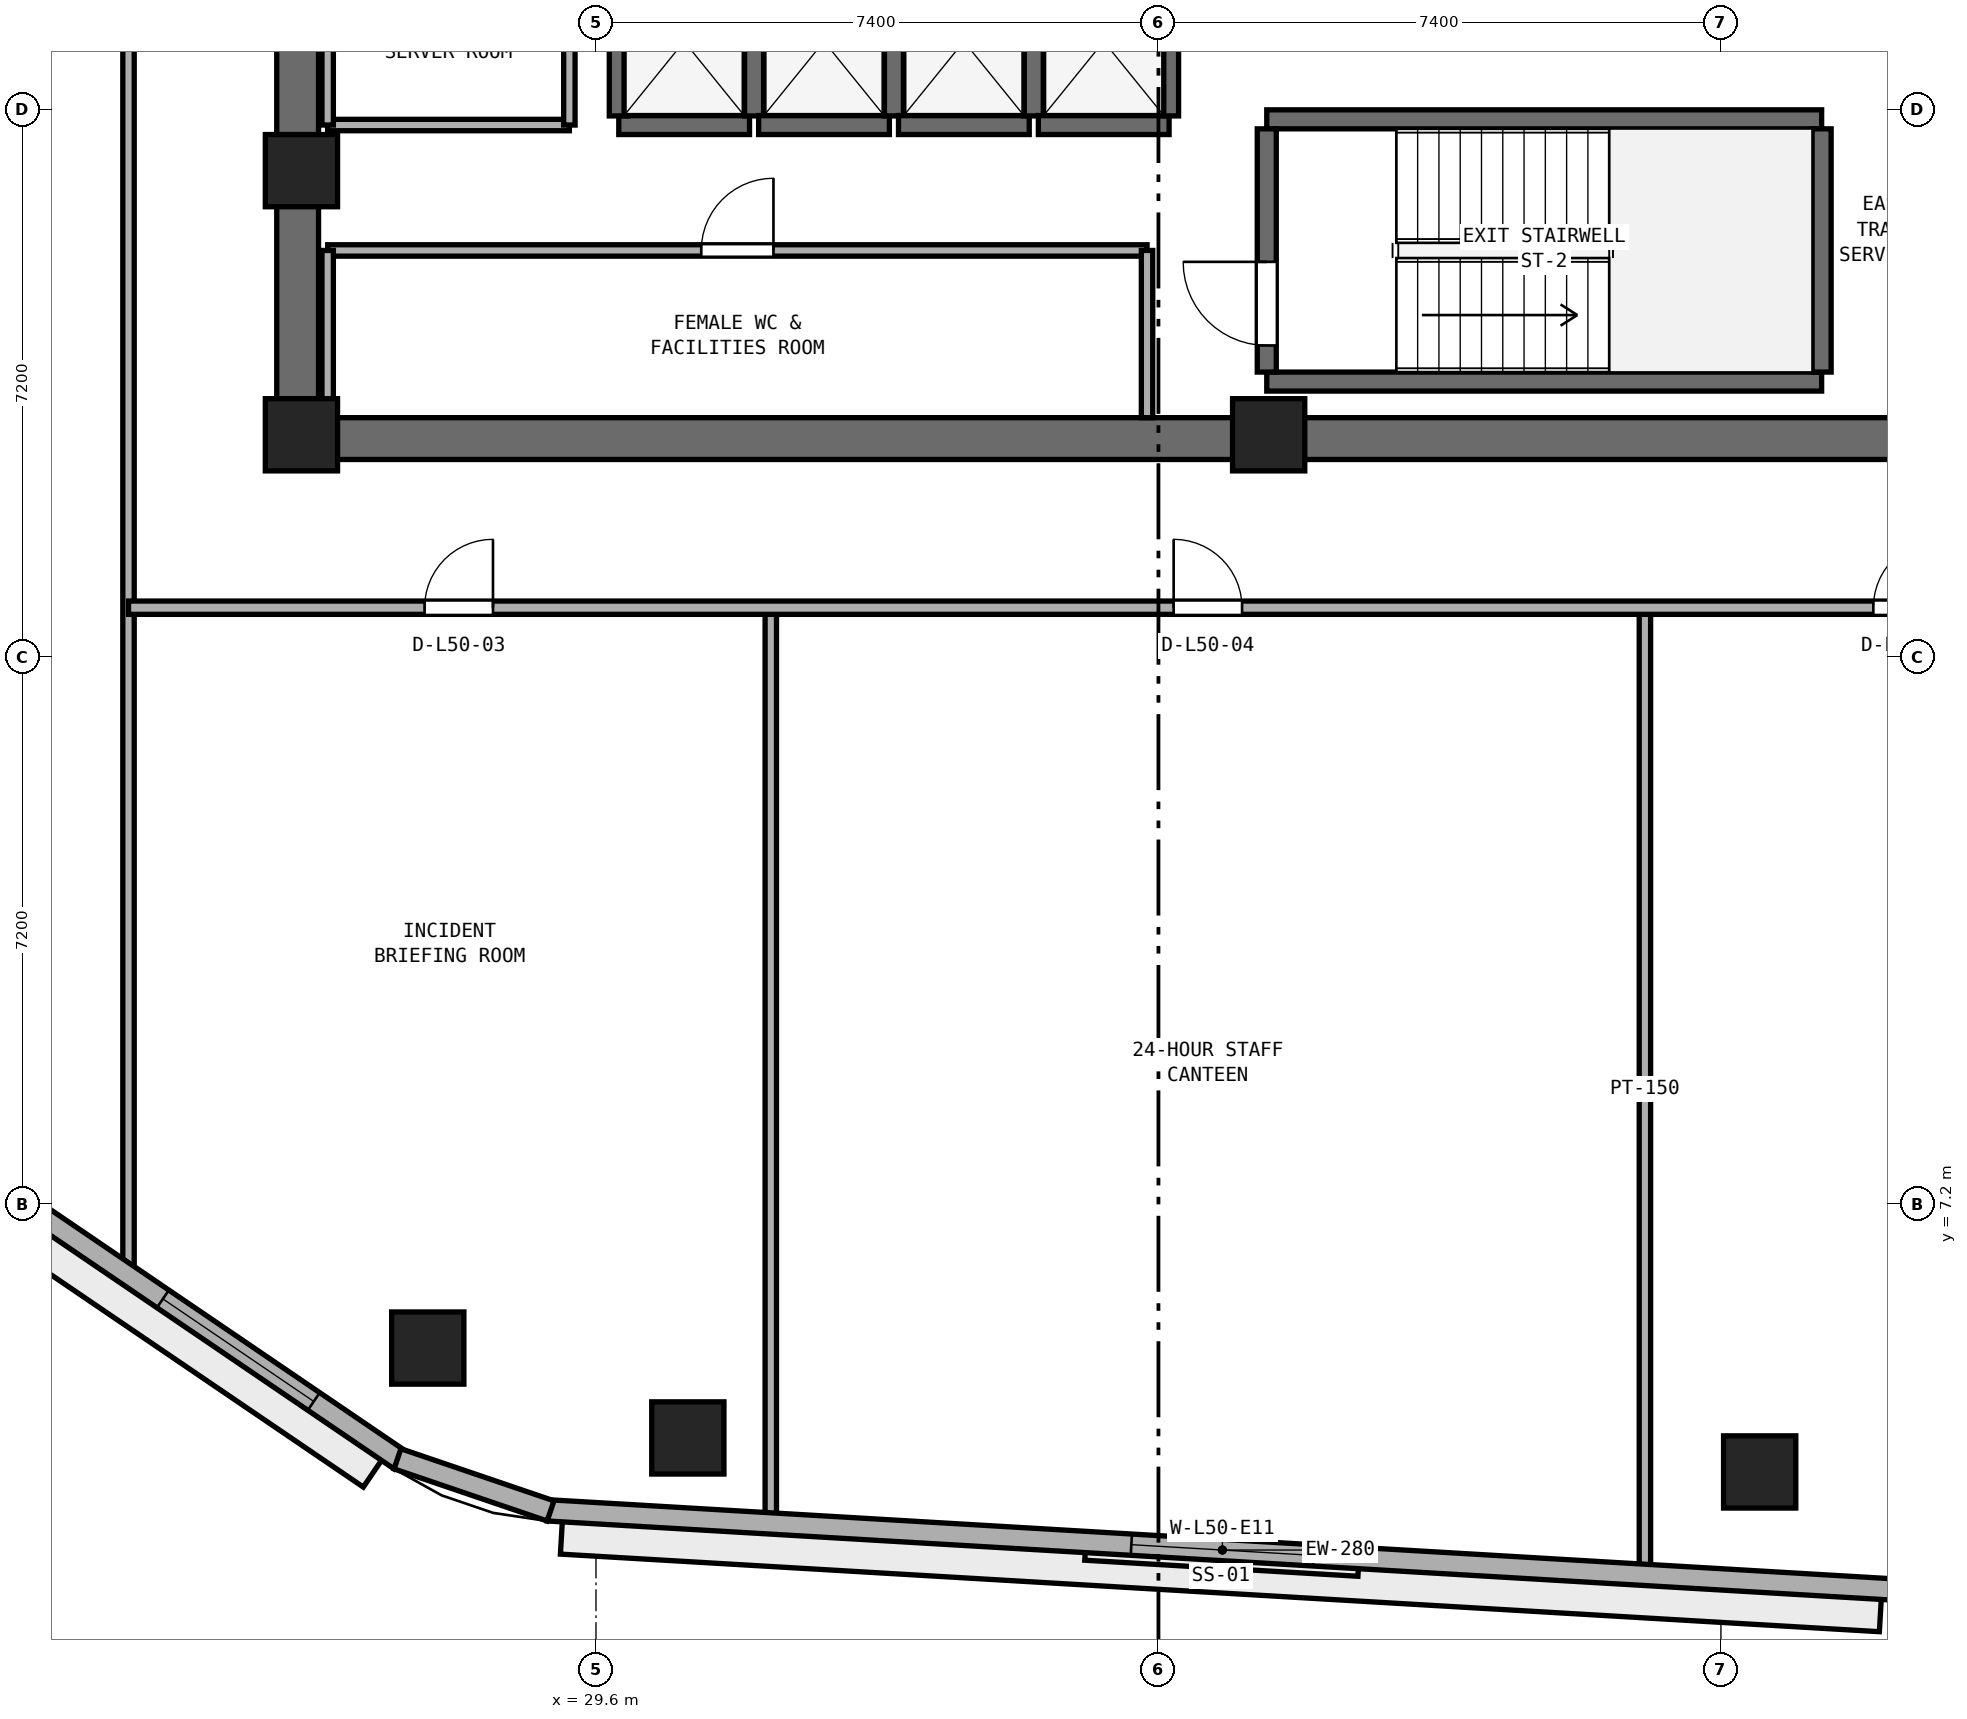
"""IFC4 building model, lengths in metres.
Left out: names, types, materials, properties, quantities, classifications, styles, units other than length and angle.
Written with IfcOpenShell. Run it as: python <this file> out.ifc"""

import sys

from ifc_helpers import new_model, si_unit, direction, frame, frame_2d, origin, origin_2d, place, context, subcontext, project, spatial, rectangle, extrude, element, fill, save


model = new_model("IFC4")
c1 = context("Model", 3, precision=1e-05, world=origin(), true_north=direction((0.0, 1.0)))
c2 = subcontext(c1, "Body", "Model", "MODEL_VIEW")
j1 = project(units=[si_unit("LENGTHUNIT", "METRE"), si_unit("PLANEANGLEUNIT", "RADIAN")], contexts=[c1])
p1 = place(None, origin())
s1 = spatial("IfcSite", under=j1, at=p1, CompositionType="ELEMENT")
p2 = place(p1, origin())
s2 = spatial("IfcBuilding", under=s1, at=p2, CompositionType="ELEMENT")
p3 = place(p2, frame((0.0, 0.0, 197.2)))
s3 = spatial("IfcBuildingStorey", under=s2, at=p3, CompositionType="ELEMENT", Elevation=197.2)
p4 = place(p3, frame((25.4, 17.275, 0.0), z_axis=(0.0, 0.0, 1.0), x_axis=(1.0, 0.0, 0.0)))
e1 = element("IfcWall", 1, at=p4, inside=s3, PredefinedType="SHEAR", context=c2, shape_type="SweptSolid", body=[
    extrude(rectangle(XDim=23.2, YDim=0.55, at=frame_2d((11.6, 0.0))), origin(), (0.0, 0.0, 1.0), 3.54),
])
p5 = place(p3, frame((25.675, 17.55, 0.0), z_axis=(0.0, 0.0, 1.0), x_axis=(0.0, 1.0, 0.0)))
e2 = element("IfcWall", 2, at=p5, inside=s3, PredefinedType="SHEAR", context=c2, shape_type="SweptSolid", body=[
    extrude(rectangle(XDim=15.3, YDim=0.55, at=frame_2d((7.65, 0.0))), origin(), (0.0, 0.0, 1.0), 3.54),
])
p6 = place(p5, frame((6.9, 0.0, 0.0)))
e3 = element("IfcOpeningElement", 3, at=p6, cuts=e2, PredefinedType="OPENING", context=c2, shape_type="SweptSolid", body=[
    extrude(rectangle(XDim=1.5, YDim=2.15, at=frame_2d((0.75, 1.075))), frame((0.0, 0.285, 0.0), z_axis=(0.0, -1.0, 0.0), x_axis=(1.0, 0.0, 0.0)), (0.0, 0.0, 1.0), 0.57),
])
for number, where, z_axis, x_axis in (
    (4, (25.725, 17.325, 0.0), (0.0, 0.0, 1.0), (1.0, 0.0, 0.0)),
    (5, (38.45, 17.325, 0.0), (0.0, 0.0, 1.0), (1.0, 0.0, 0.0)),
    (6, (25.725, 20.8, 0.0), (0.0, 0.0, 1.0), (1.0, 0.0, 0.0)),
):
    element("IfcColumn", number, at=place(p3, frame(where, z_axis=z_axis, x_axis=x_axis)), inside=s3, PredefinedType="PILASTER", context=c2, shape_type="SweptSolid", body=[
        extrude(rectangle(XDim=0.95, YDim=0.95, at=origin_2d()), origin(), (0.0, 0.0, 1.0), 3.8),
    ])
for number, where, z_axis, x_axis in (
    (7, (30.809, 4.127, 0.0), (0.0, 0.0, 1.0), (1.0, 0.0, 0.0)),
    (8, (44.91, 3.68, 0.0), (0.0, 0.0, 1.0), (1.0, 0.0, 0.0)),
    (9, (27.387, 5.31, 0.0), (0.0, 0.0, 1.0), (1.0, 0.0, 0.0)),
):
    element("IfcColumn", number, at=place(p3, frame(where, z_axis=z_axis, x_axis=x_axis)), inside=s3, PredefinedType="COLUMN", context=c2, shape_type="SweptSolid", body=[
        extrude(rectangle(XDim=0.95, YDim=0.95, at=origin_2d()), origin(), (0.0, 0.0, 1.0), 3.8),
    ])
for number, where, z_axis, x_axis in (
    (10, (38.425, 18.025, 0.0), (0.0, 0.0, 1.0), (1.0, 0.0, 0.0)),
    (11, (38.425, 21.475, 0.0), (0.0, 0.0, 1.0), (1.0, 0.0, 0.0)),
):
    element("IfcWall", number, at=place(p3, frame(where, z_axis=z_axis, x_axis=x_axis)), inside=s3, PredefinedType="SHEAR", context=c2, shape_type="SweptSolid", body=[
        extrude(rectangle(XDim=7.3, YDim=0.25, at=frame_2d((3.65, 0.0))), origin(), (0.0, 0.0, 1.0), 3.54),
    ])
p7 = place(p3, frame((38.425, 18.15, 0.0), z_axis=(0.0, 0.0, 1.0), x_axis=(0.0, 1.0, 0.0)))
e12 = element("IfcWall", 12, at=p7, inside=s3, PredefinedType="SHEAR", context=c2, shape_type="SweptSolid", body=[
    extrude(rectangle(XDim=3.2, YDim=0.25, at=frame_2d((1.6, 0.0))), origin(), (0.0, 0.0, 1.0), 3.54),
])
p8 = place(p7, frame((0.35, 0.0, 0.0)))
e13 = element("IfcOpeningElement", 13, at=p8, cuts=e12, PredefinedType="OPENING", context=c2, shape_type="SweptSolid", body=[
    extrude(rectangle(XDim=1.1, YDim=2.15, at=frame_2d((0.55, 1.075))), frame((0.0, 0.135, 0.0), z_axis=(0.0, -1.0, 0.0), x_axis=(1.0, 0.0, 0.0)), (0.0, 0.0, 1.0), 0.27),
])
p9 = place(p3, frame((45.725, 18.15, 0.0), z_axis=(0.0, 0.0, 1.0), x_axis=(0.0, 1.0, 0.0)))
e14 = element("IfcWall", 14, at=p9, inside=s3, PredefinedType="SHEAR", context=c2, shape_type="SweptSolid", body=[
    extrude(rectangle(XDim=3.2, YDim=0.25, at=frame_2d((1.6, 0.0))), origin(), (0.0, 0.0, 1.0), 3.54),
])
p10 = place(p3, frame((29.9, 21.4, 0.0), z_axis=(0.0, 0.0, 1.0), x_axis=(1.0, 0.0, 0.0)))
e15 = element("IfcWall", 15, at=p10, inside=s3, PredefinedType="SHEAR", context=c2, shape_type="SweptSolid", body=[
    extrude(rectangle(XDim=1.72, YDim=0.25, at=frame_2d((0.86, 0.0))), origin(), (0.0, 0.0, 1.0), 3.54),
])
for number, where, z_axis, x_axis in (
    (16, (29.9, 21.52, 0.0), (0.0, 0.0, 1.0), (0.0, 1.0, 0.0)),
    (17, (31.68, 21.52, 0.0), (0.0, 0.0, 1.0), (0.0, 1.0, 0.0)),
):
    element("IfcWall", number, at=place(p3, frame(where, z_axis=z_axis, x_axis=x_axis)), inside=s3, PredefinedType="SHEAR", context=c2, shape_type="SweptSolid", body=[
        extrude(rectangle(XDim=1.96, YDim=0.25, at=frame_2d((0.98, 0.0))), origin(), (0.0, 0.0, 1.0), 3.54),
    ])
p11 = place(p3, frame((31.74, 21.4, 0.0), z_axis=(0.0, 0.0, 1.0), x_axis=(1.0, 0.0, 0.0)))
e18 = element("IfcWall", 18, at=p11, inside=s3, PredefinedType="SHEAR", context=c2, shape_type="SweptSolid", body=[
    extrude(rectangle(XDim=1.72, YDim=0.25, at=frame_2d((0.86, 0.0))), origin(), (0.0, 0.0, 1.0), 3.54),
])
p12 = place(p3, frame((33.52, 21.52, 0.0), z_axis=(0.0, 0.0, 1.0), x_axis=(0.0, 1.0, 0.0)))
e19 = element("IfcWall", 19, at=p12, inside=s3, PredefinedType="SHEAR", context=c2, shape_type="SweptSolid", body=[
    extrude(rectangle(XDim=1.96, YDim=0.25, at=frame_2d((0.98, 0.0))), origin(), (0.0, 0.0, 1.0), 3.54),
])
p13 = place(p3, frame((33.58, 21.4, 0.0), z_axis=(0.0, 0.0, 1.0), x_axis=(1.0, 0.0, 0.0)))
e20 = element("IfcWall", 20, at=p13, inside=s3, PredefinedType="SHEAR", context=c2, shape_type="SweptSolid", body=[
    extrude(rectangle(XDim=1.72, YDim=0.25, at=frame_2d((0.86, 0.0))), origin(), (0.0, 0.0, 1.0), 3.54),
])
p14 = place(p3, frame((35.36, 21.52, 0.0), z_axis=(0.0, 0.0, 1.0), x_axis=(0.0, 1.0, 0.0)))
e21 = element("IfcWall", 21, at=p14, inside=s3, PredefinedType="SHEAR", context=c2, shape_type="SweptSolid", body=[
    extrude(rectangle(XDim=1.96, YDim=0.25, at=frame_2d((0.98, 0.0))), origin(), (0.0, 0.0, 1.0), 3.54),
])
p15 = place(p3, frame((35.42, 21.4, 0.0), z_axis=(0.0, 0.0, 1.0), x_axis=(1.0, 0.0, 0.0)))
e22 = element("IfcWall", 22, at=p15, inside=s3, PredefinedType="SHEAR", context=c2, shape_type="SweptSolid", body=[
    extrude(rectangle(XDim=1.72, YDim=0.25, at=frame_2d((0.86, 0.0))), origin(), (0.0, 0.0, 1.0), 3.54),
])
p16 = place(p3, frame((37.14, 21.52, 0.0), z_axis=(0.0, 0.0, 1.0), x_axis=(0.0, 1.0, 0.0)))
e23 = element("IfcWall", 23, at=p16, inside=s3, PredefinedType="SHEAR", context=c2, shape_type="SweptSolid", body=[
    extrude(rectangle(XDim=1.96, YDim=0.25, at=frame_2d((0.98, 0.0))), origin(), (0.0, 0.0, 1.0), 3.54),
])
p17 = place(p3, frame((26.07, 19.75, 0.0), z_axis=(0.0, 0.0, 1.0), x_axis=(1.0, 0.0, 0.0)))
e24 = element("IfcWall", 24, at=p17, inside=s3, PredefinedType="PARTITIONING", context=c2, shape_type="SweptSolid", body=[
    extrude(rectangle(XDim=10.78, YDim=0.15, at=frame_2d((5.39, 0.0))), origin(), (0.0, 0.0, 1.0), 3.54),
])
p18 = place(p17, frame((4.915, 0.0, 0.0)))
e25 = element("IfcOpeningElement", 25, at=p18, cuts=e24, PredefinedType="OPENING", context=c2, shape_type="SweptSolid", body=[
    extrude(rectangle(XDim=0.95, YDim=2.1, at=frame_2d((0.475, 1.05))), frame((0.0, 0.085, 0.0), z_axis=(0.0, -1.0, 0.0), x_axis=(1.0, 0.0, 0.0)), (0.0, 0.0, 1.0), 0.17),
])
p19 = place(p3, frame((26.07, 17.55, 0.0), z_axis=(0.0, 0.0, 1.0), x_axis=(0.0, 1.0, 0.0)))
e26 = element("IfcWall", 26, at=p19, inside=s3, PredefinedType="PARTITIONING", context=c2, shape_type="SweptSolid", body=[
    extrude(rectangle(XDim=2.2, YDim=0.15, at=frame_2d((1.1, 0.0))), origin(), (0.0, 0.0, 1.0), 2.64),
])
p20 = place(p3, frame((36.85, 17.55, 0.0), z_axis=(0.0, 0.0, 1.0), x_axis=(0.0, 1.0, 0.0)))
e27 = element("IfcWall", 27, at=p20, inside=s3, PredefinedType="PARTITIONING", context=c2, shape_type="SweptSolid", body=[
    extrude(rectangle(XDim=2.2, YDim=0.15, at=frame_2d((1.1, 0.0))), origin(), (0.0, 0.0, 1.0), 3.54),
])
p21 = place(p3, frame((26.07, 21.4, 0.0), z_axis=(0.0, 0.0, 1.0), x_axis=(1.0, 0.0, 0.0)))
e28 = element("IfcWall", 28, at=p21, inside=s3, PredefinedType="PARTITIONING", context=c2, shape_type="SweptSolid", body=[
    extrude(rectangle(XDim=3.18, YDim=0.15, at=frame_2d((1.59, 0.0))), origin(), (0.0, 0.0, 1.0), 3.54),
])
p22 = place(p3, frame((26.07, 21.4, 0.0), z_axis=(0.0, 0.0, 1.0), x_axis=(0.0, 1.0, 0.0)))
e29 = element("IfcWall", 29, at=p22, inside=s3, PredefinedType="PARTITIONING", context=c2, shape_type="SweptSolid", body=[
    extrude(rectangle(XDim=2.2, YDim=0.15, at=frame_2d((1.1, 0.0))), origin(), (0.0, 0.0, 1.0), 2.64),
])
p23 = place(p3, frame((29.25, 21.4, 0.0), z_axis=(0.0, 0.0, 1.0), x_axis=(0.0, 1.0, 0.0)))
e30 = element("IfcWall", 30, at=p23, inside=s3, PredefinedType="PARTITIONING", context=c2, shape_type="SweptSolid", body=[
    extrude(rectangle(XDim=2.2, YDim=0.15, at=frame_2d((1.1, 0.0))), origin(), (0.0, 0.0, 1.0), 3.54),
])
p24 = place(p3, frame((43.4, 2.391, 0.0), z_axis=(0.0, 0.0, 1.0), x_axis=(0.0, 1.0, 0.0)))
e31 = element("IfcWall", 31, at=p24, inside=s3, PredefinedType="PARTITIONING", context=c2, shape_type="SweptSolid", body=[
    extrude(rectangle(XDim=12.659, YDim=0.15, at=frame_2d((6.33, 0.0))), origin(), (0.0, 0.0, 1.0), 3.54),
])
p25 = place(p3, frame((31.9, 3.067, 0.0), z_axis=(0.0, 0.0, 1.0), x_axis=(0.0, 1.0, 0.0)))
e32 = element("IfcWall", 32, at=p25, inside=s3, PredefinedType="PARTITIONING", context=c2, shape_type="SweptSolid", body=[
    extrude(rectangle(XDim=11.983, YDim=0.15, at=frame_2d((5.991, 0.0))), origin(), (0.0, 0.0, 1.0), 3.54),
])
p26 = place(p3, frame((23.45, 6.235, 0.0), z_axis=(0.0, 0.0, 1.0), x_axis=(0.0, 1.0, 0.0)))
e33 = element("IfcWall", 33, at=p26, inside=s3, PredefinedType="PARTITIONING", context=c2, shape_type="SweptSolid", body=[
    extrude(rectangle(XDim=17.615, YDim=0.15, at=frame_2d((8.808, 0.0))), origin(), (0.0, 0.0, 1.0), 3.54),
])
p27 = place(p3, frame((23.45, 15.05, 0.0), z_axis=(0.0, 0.0, 1.0), x_axis=(1.0, 0.0, 0.0)))
e34 = element("IfcWall", 34, at=p27, inside=s3, PredefinedType="PARTITIONING", context=c2, shape_type="SweptSolid", body=[
    extrude(rectangle(XDim=27.1, YDim=0.175, at=frame_2d((13.55, 0.0))), origin(), (0.0, 0.0, 1.0), 3.54),
])
p28 = place(p27, frame((3.895, 0.0, 0.0)))
e35 = element("IfcOpeningElement", 35, at=p28, cuts=e34, PredefinedType="OPENING", context=c2, shape_type="SweptSolid", body=[
    extrude(rectangle(XDim=0.9, YDim=2.1, at=frame_2d((0.45, 1.05))), frame((0.0, 0.097, 0.0), z_axis=(0.0, -1.0, 0.0), x_axis=(1.0, 0.0, 0.0)), (0.0, 0.0, 1.0), 0.195),
])
p29 = place(p27, frame((13.75, 0.0, 0.0)))
e36 = element("IfcOpeningElement", 36, at=p29, cuts=e34, PredefinedType="OPENING", context=c2, shape_type="SweptSolid", body=[
    extrude(rectangle(XDim=0.9, YDim=2.1, at=frame_2d((0.45, 1.05))), frame((0.0, 0.097, 0.0), z_axis=(0.0, -1.0, 0.0), x_axis=(1.0, 0.0, 0.0)), (0.0, 0.0, 1.0), 0.195),
])
p30 = place(p27, frame((22.955, 0.0, 0.0)))
e37 = element("IfcOpeningElement", 37, at=p30, cuts=e34, PredefinedType="OPENING", context=c2, shape_type="SweptSolid", body=[
    extrude(rectangle(XDim=0.9, YDim=2.1, at=frame_2d((0.45, 1.05))), frame((0.0, 0.097, 0.0), z_axis=(0.0, -1.0, 0.0), x_axis=(1.0, 0.0, 0.0)), (0.0, 0.0, 1.0), 0.195),
])
p31 = place(p3, frame((28.966, 3.175, 0.0), z_axis=(0.0, 0.0, 1.0), x_axis=(0.998274467859, -0.058720412304, 0.0)))
e38 = element("IfcWall", 38, at=p31, inside=s3, PredefinedType="STANDARD", context=c2, shape_type="SweptSolid", body=[
    extrude(rectangle(XDim=17.782, YDim=0.28, at=frame_2d((8.891, 0.0))), origin(), (0.0, 0.0, 1.0), 3.54),
])
p32 = place(p31, frame((7.691, 0.0, 0.9)))
e39 = element("IfcOpeningElement", 39, at=p32, cuts=e38, PredefinedType="OPENING", context=c2, shape_type="SweptSolid", body=[
    extrude(rectangle(XDim=2.4, YDim=1.75, at=frame_2d((1.2, 0.875))), frame((0.0, 0.15, 0.0), z_axis=(0.0, -1.0, 0.0), x_axis=(1.0, 0.0, 0.0)), (0.0, 0.0, 1.0), 0.3),
])
p33 = place(p3, frame((13.43, 13.075, 0.0), z_axis=(0.0, 0.0, 1.0), x_axis=(0.827025402003, -0.562164552815, 0.0)))
e40 = element("IfcWall", 40, at=p33, inside=s3, PredefinedType="STANDARD", context=c2, shape_type="SweptSolid", body=[
    extrude(rectangle(XDim=16.435, YDim=0.28, at=frame_2d((8.218, 0.0))), origin(), (0.0, 0.0, 1.0), 3.54),
])
p34 = place(p33, frame((1.873, 0.0, 0.9)))
e41 = element("IfcOpeningElement", 41, at=p34, cuts=e40, PredefinedType="OPENING", context=c2, shape_type="SweptSolid", body=[
    extrude(rectangle(XDim=2.4, YDim=1.75, at=frame_2d((1.2, 0.875))), frame((0.0, 0.15, 0.0), z_axis=(0.0, -1.0, 0.0), x_axis=(1.0, 0.0, 0.0)), (0.0, 0.0, 1.0), 0.3),
])
p35 = place(p33, frame((7.018, 0.0, 0.9)))
e42 = element("IfcOpeningElement", 42, at=p35, cuts=e40, PredefinedType="OPENING", context=c2, shape_type="SweptSolid", body=[
    extrude(rectangle(XDim=2.4, YDim=1.75, at=frame_2d((1.2, 0.875))), frame((0.0, 0.15, 0.0), z_axis=(0.0, -1.0, 0.0), x_axis=(1.0, 0.0, 0.0)), (0.0, 0.0, 1.0), 0.3),
])
p36 = place(p33, frame((12.663, 0.0, 0.9)))
e43 = element("IfcOpeningElement", 43, at=p36, cuts=e40, PredefinedType="OPENING", context=c2, shape_type="SweptSolid", body=[
    extrude(rectangle(XDim=2.4, YDim=1.75, at=frame_2d((1.2, 0.875))), frame((0.0, 0.15, 0.0), z_axis=(0.0, -1.0, 0.0), x_axis=(1.0, 0.0, 0.0)), (0.0, 0.0, 1.0), 0.3),
])
p37 = place(p3, frame((26.989, 3.853, 0.0), z_axis=(0.0, 0.0, 1.0), x_axis=(0.946713959835, -0.322075578479, 0.0)))
e44 = element("IfcWall", 44, at=p37, inside=s3, PredefinedType="STANDARD", context=c2, shape_type="SweptSolid", body=[
    extrude(rectangle(XDim=2.127, YDim=0.28, at=frame_2d((1.063, 0.0))), origin(), (0.0, 0.0, 1.0), 3.54),
])
p38 = place(p8, origin())
e45 = element("IfcDoor", 45, at=p38, inside=s3, OperationType="SINGLE_SWING_RIGHT", PredefinedType="DOOR", context=c2, shape_type="SweptSolid", body=[
    extrude(rectangle(XDim=1.1, YDim=2.15, at=frame_2d((0.55, 1.075))), frame((0.0, 0.025, 0.0), z_axis=(0.0, -1.0, 0.0), x_axis=(1.0, 0.0, 0.0)), (0.0, 0.0, 1.0), 0.05),
])
fill(e13, e45)
p39 = place(p18, origin())
e46 = element("IfcDoor", 46, at=p39, inside=s3, OperationType="SINGLE_SWING_RIGHT", PredefinedType="DOOR", context=c2, shape_type="SweptSolid", body=[
    extrude(rectangle(XDim=0.95, YDim=2.1, at=frame_2d((0.475, 1.05))), frame((0.0, 0.025, 0.0), z_axis=(0.0, -1.0, 0.0), x_axis=(1.0, 0.0, 0.0)), (0.0, 0.0, 1.0), 0.05),
])
fill(e25, e46)
p40 = place(p28, origin())
e47 = element("IfcDoor", 47, at=p40, inside=s3, OperationType="SINGLE_SWING_RIGHT", PredefinedType="DOOR", context=c2, shape_type="SweptSolid", body=[
    extrude(rectangle(XDim=0.9, YDim=2.1, at=frame_2d((0.45, 1.05))), frame((0.0, 0.025, 0.0), z_axis=(0.0, -1.0, 0.0), x_axis=(1.0, 0.0, 0.0)), (0.0, 0.0, 1.0), 0.05),
])
fill(e35, e47)
p41 = place(p29, origin())
e48 = element("IfcDoor", 48, at=p41, inside=s3, OperationType="SINGLE_SWING_LEFT", PredefinedType="DOOR", context=c2, shape_type="SweptSolid", body=[
    extrude(rectangle(XDim=0.9, YDim=2.1, at=frame_2d((0.45, 1.05))), frame((0.0, 0.025, 0.0), z_axis=(0.0, -1.0, 0.0), x_axis=(1.0, 0.0, 0.0)), (0.0, 0.0, 1.0), 0.05),
])
fill(e36, e48)
p42 = place(p30, origin())
e49 = element("IfcDoor", 49, at=p42, inside=s3, OperationType="SINGLE_SWING_RIGHT", PredefinedType="DOOR", context=c2, shape_type="SweptSolid", body=[
    extrude(rectangle(XDim=0.9, YDim=2.1, at=frame_2d((0.45, 1.05))), frame((0.0, 0.025, 0.0), z_axis=(0.0, -1.0, 0.0), x_axis=(1.0, 0.0, 0.0)), (0.0, 0.0, 1.0), 0.05),
])
fill(e37, e49)
p43 = place(p32, origin())
e50 = element("IfcWindow", 50, at=p43, inside=s3, PartitioningType="SINGLE_PANEL", PredefinedType="WINDOW", context=c2, shape_type="SweptSolid", body=[
    extrude(rectangle(XDim=2.4, YDim=1.75, at=frame_2d((1.2, 0.875))), frame((0.0, 0.03, 0.0), z_axis=(0.0, -1.0, 0.0), x_axis=(1.0, 0.0, 0.0)), (0.0, 0.0, 1.0), 0.06),
])
fill(e39, e50)
p44 = place(p36, origin())
e51 = element("IfcWindow", 51, at=p44, inside=s3, PartitioningType="SINGLE_PANEL", PredefinedType="WINDOW", context=c2, shape_type="SweptSolid", body=[
    extrude(rectangle(XDim=2.4, YDim=1.75, at=frame_2d((1.2, 0.875))), frame((0.0, 0.03, 0.0), z_axis=(0.0, -1.0, 0.0), x_axis=(1.0, 0.0, 0.0)), (0.0, 0.0, 1.0), 0.06),
])
fill(e43, e51)
save(model, sys.argv[1])
